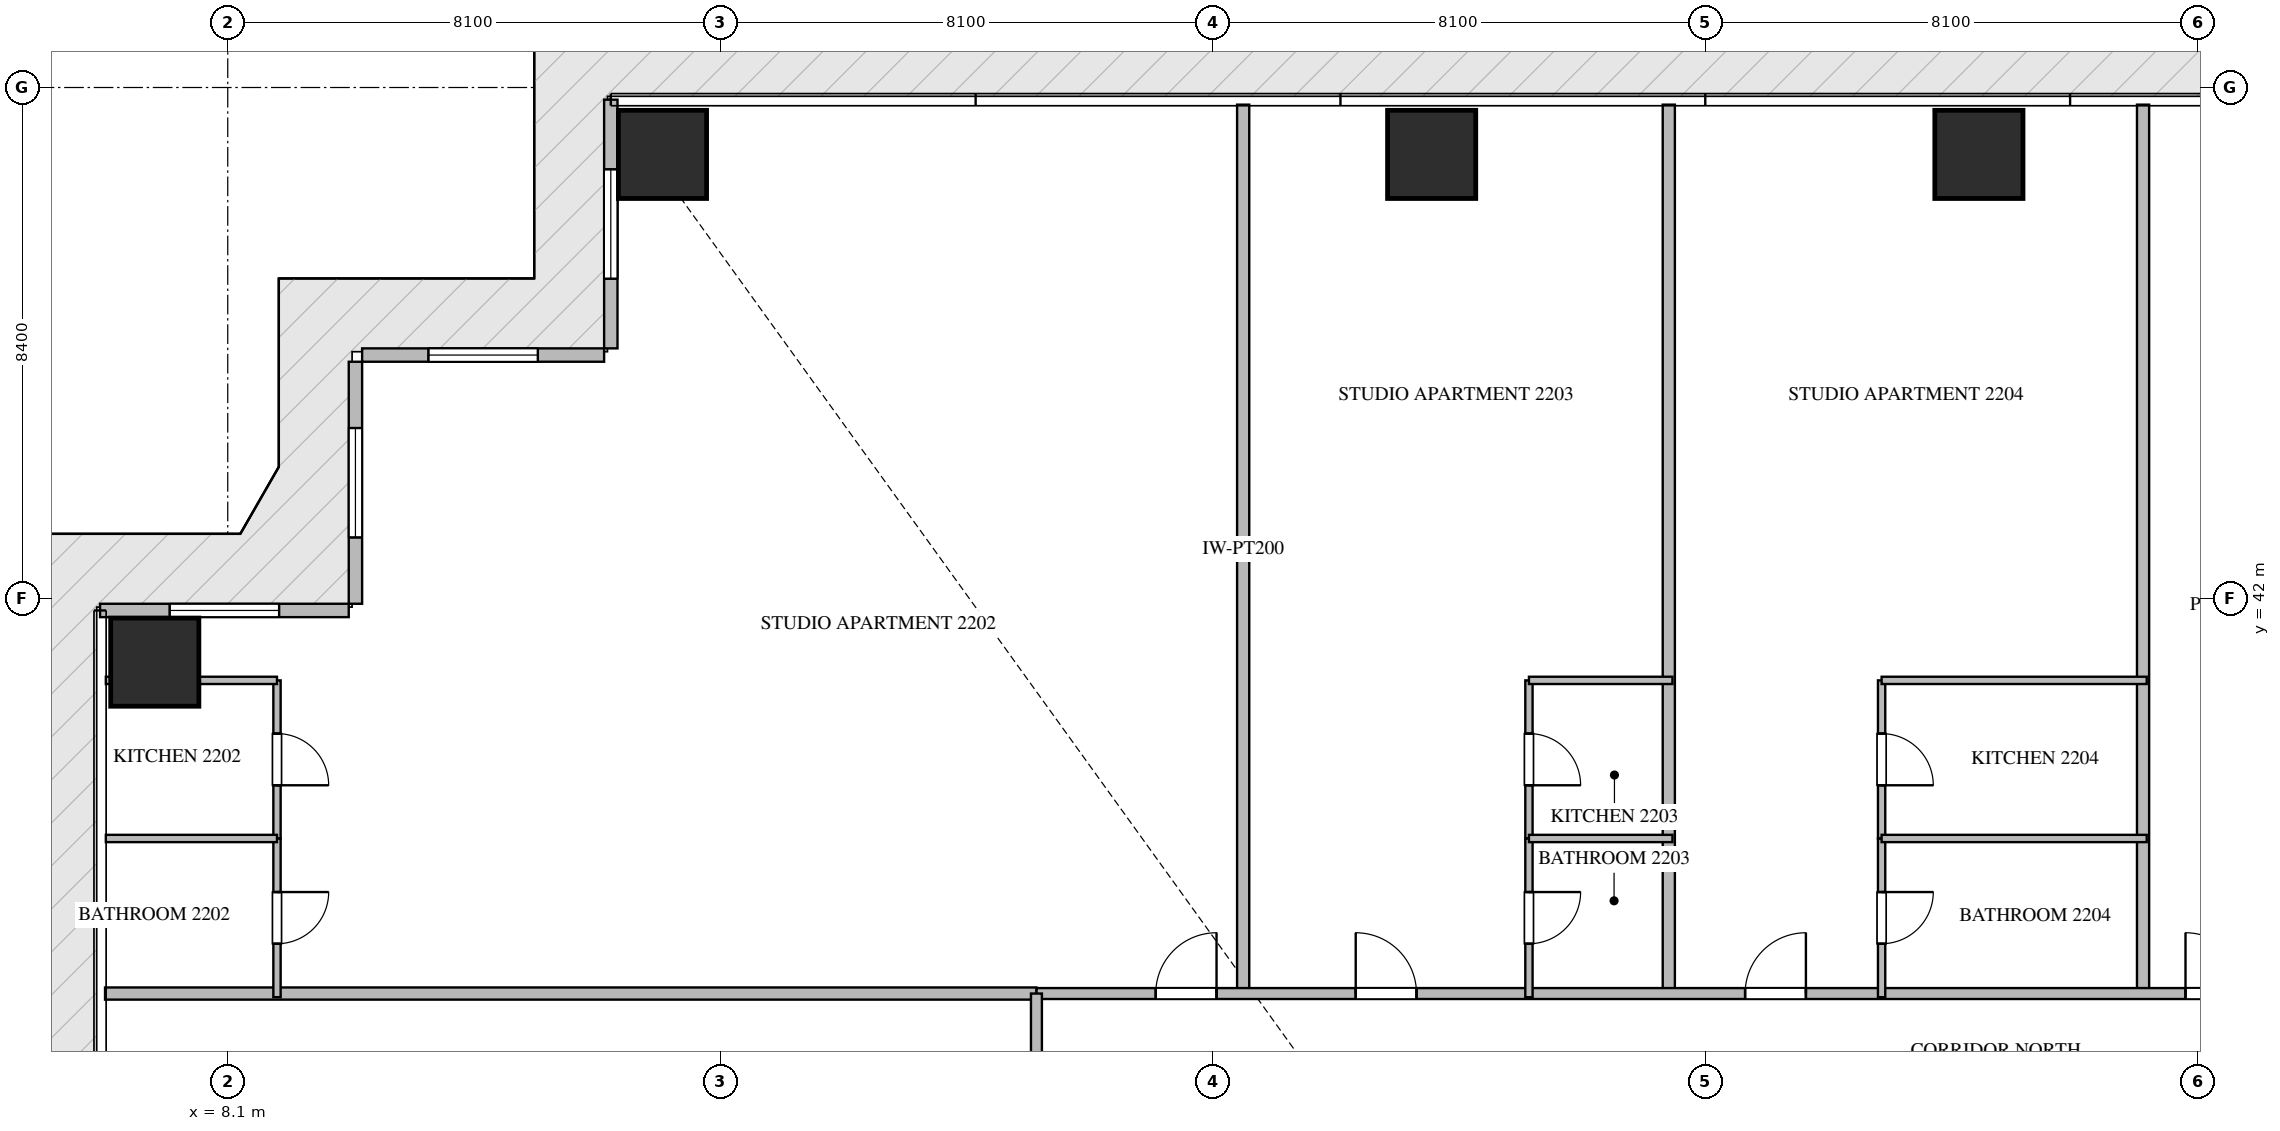
"""IFC4 building model, lengths in metres.
Left out: names, types, materials, properties, quantities, classifications, styles, units other than length and angle.
Written with IfcOpenShell. Run it as: python <this file> out.ifc"""

import sys

from ifc_helpers import new_model, si_unit, direction, frame, frame_2d, origin, origin_2d, place, context, subcontext, project, spatial, rectangle, extrude, source, transform, mapped, element, fill, save


model = new_model("IFC4")
c1 = context("Model", 3, precision=1e-05, world=origin(), true_north=direction((0.0, 1.0)))
c2 = subcontext(c1, "Body", "Model", "MODEL_VIEW")
j1 = project(units=[si_unit("LENGTHUNIT", "METRE"), si_unit("PLANEANGLEUNIT", "RADIAN")], contexts=[c1])
p1 = place(None, origin())
s1 = spatial("IfcSite", under=j1, at=p1, CompositionType="ELEMENT")
p2 = place(p1, origin())
s2 = spatial("IfcBuilding", under=s1, at=p2, CompositionType="ELEMENT")
p3 = place(p2, frame((0.0, 0.0, 90.45)))
s3 = spatial("IfcBuildingStorey", under=s2, at=p3, CompositionType="ELEMENT", Elevation=90.45)
m1 = source(origin(), c2, "Body", "SweptSolid", [
    extrude(rectangle(XDim=1.45, YDim=1.45, at=origin_2d()), origin(), (0.0, 0.0, 1.0), 3.75),
])
for number, where, z_axis, x_axis in (
    (1, (15.25, 49.3, -0.26), (0.0, 0.0, 1.0), (1.0, 0.0, 0.0)),
    (2, (27.9, 49.3, -0.26), (0.0, 0.0, 1.0), (1.0, 0.0, 0.0)),
    (3, (36.9, 49.3, -0.26), (0.0, 0.0, 1.0), (1.0, 0.0, 0.0)),
    (4, (6.9, 40.95, -0.26), (0.0, 0.0, 1.0), (1.0, 0.0, 0.0)),
):
    element("IfcColumn", number, at=place(p3, frame(where, z_axis=z_axis, x_axis=x_axis)), inside=s3, PredefinedType="COLUMN", context=c2, shape_type="MappedRepresentation", body=[
        mapped(m1, transform((0.0, 0.0, 0.0), scale=1.0)),
    ])
p4 = place(p3, frame((14.4, 50.2, 0.0), z_axis=(0.0, 0.0, 1.0), x_axis=(0.0, -1.0, 0.0)))
e5 = element("IfcWall", 5, at=p4, inside=s3, PredefinedType="ELEMENTEDWALL", context=c2, shape_type="SweptSolid", body=[
    extrude(rectangle(XDim=4.09, YDim=0.22, at=frame_2d((2.045, 0.0))), origin(), (0.0, 0.0, 1.0), 3.475),
])
p5 = place(p4, frame((1.145, 0.0, 0.65)))
e6 = element("IfcOpeningElement", 6, at=p5, cuts=e5, PredefinedType="OPENING", context=c2, shape_type="SweptSolid", body=[
    extrude(rectangle(XDim=1.8, YDim=2.1, at=frame_2d((0.9, 1.05))), frame((0.0, 0.12, 0.0), z_axis=(0.0, -1.0, 0.0), x_axis=(1.0, 0.0, 0.0)), (0.0, 0.0, 1.0), 0.24),
])
p6 = place(p3, frame((14.29, 46.0, 0.0), z_axis=(0.0, 0.0, 1.0), x_axis=(-1.0, 0.0, 0.0)))
e7 = element("IfcWall", 7, at=p6, inside=s3, PredefinedType="ELEMENTEDWALL", context=c2, shape_type="SweptSolid", body=[
    extrude(rectangle(XDim=3.98, YDim=0.22, at=frame_2d((1.99, 0.0))), origin(), (0.0, 0.0, 1.0), 3.475),
])
p7 = place(p6, frame((1.09, 0.0, 0.65)))
e8 = element("IfcOpeningElement", 8, at=p7, cuts=e7, PredefinedType="OPENING", context=c2, shape_type="SweptSolid", body=[
    extrude(rectangle(XDim=1.8, YDim=2.1, at=frame_2d((0.9, 1.05))), frame((0.0, 0.12, 0.0), z_axis=(0.0, -1.0, 0.0), x_axis=(1.0, 0.0, 0.0)), (0.0, 0.0, 1.0), 0.24),
])
p8 = place(p3, frame((10.2, 45.89, 0.0), z_axis=(0.0, 0.0, 1.0), x_axis=(0.0, -1.0, 0.0)))
e9 = element("IfcWall", 9, at=p8, inside=s3, PredefinedType="ELEMENTEDWALL", context=c2, shape_type="SweptSolid", body=[
    extrude(rectangle(XDim=3.98, YDim=0.22, at=frame_2d((1.99, 0.0))), origin(), (0.0, 0.0, 1.0), 3.475),
])
p9 = place(p8, frame((1.09, 0.0, 0.65)))
e10 = element("IfcOpeningElement", 10, at=p9, cuts=e9, PredefinedType="OPENING", context=c2, shape_type="SweptSolid", body=[
    extrude(rectangle(XDim=1.8, YDim=2.1, at=frame_2d((0.9, 1.05))), frame((0.0, 0.12, 0.0), z_axis=(0.0, -1.0, 0.0), x_axis=(1.0, 0.0, 0.0)), (0.0, 0.0, 1.0), 0.24),
])
p10 = place(p3, frame((10.09, 41.8, 0.0), z_axis=(0.0, 0.0, 1.0), x_axis=(-1.0, 0.0, 0.0)))
e11 = element("IfcWall", 11, at=p10, inside=s3, PredefinedType="ELEMENTEDWALL", context=c2, shape_type="SweptSolid", body=[
    extrude(rectangle(XDim=4.09, YDim=0.22, at=frame_2d((2.045, 0.0))), origin(), (0.0, 0.0, 1.0), 3.475),
])
p11 = place(p10, frame((1.145, 0.0, 0.65)))
e12 = element("IfcOpeningElement", 12, at=p11, cuts=e11, PredefinedType="OPENING", context=c2, shape_type="SweptSolid", body=[
    extrude(rectangle(XDim=1.8, YDim=2.1, at=frame_2d((0.9, 1.05))), frame((0.0, 0.12, 0.0), z_axis=(0.0, -1.0, 0.0), x_axis=(1.0, 0.0, 0.0)), (0.0, 0.0, 1.0), 0.24),
])
for number, where, z_axis, x_axis in (
    (13, (24.8, 35.5, 0.0), (0.0, 0.0, 1.0), (0.0, 1.0, 0.0)),
    (14, (31.8, 35.5, 0.0), (0.0, 0.0, 1.0), (0.0, 1.0, 0.0)),
    (15, (39.6, 35.5, 0.0), (0.0, 0.0, 1.0), (0.0, 1.0, 0.0)),
):
    element("IfcWall", number, at=place(p3, frame(where, z_axis=z_axis, x_axis=x_axis)), inside=s3, PredefinedType="PARTITIONING", context=c2, shape_type="SweptSolid", body=[
        extrude(rectangle(XDim=14.618, YDim=0.2, at=frame_2d((7.309, 0.0))), origin(), (0.0, 0.0, 1.0), 3.49),
    ])
p12 = place(p3, frame((6.082, 35.5, 0.0), z_axis=(0.0, 0.0, 1.0), x_axis=(1.0, 0.0, 0.0)))
e16 = element("IfcWall", 16, at=p12, inside=s3, PredefinedType="PARTITIONING", context=c2, shape_type="SweptSolid", body=[
    extrude(rectangle(XDim=15.318, YDim=0.2, at=frame_2d((7.659, 0.0))), origin(), (0.0, 0.0, 1.0), 3.49),
])
p13 = place(p3, frame((21.402, 35.5, 0.0), z_axis=(0.0, 0.0, 1.0), x_axis=(1.0, 0.0, 0.0)))
e17 = element("IfcWall", 17, at=p13, inside=s3, PredefinedType="PARTITIONING", context=c2, shape_type="SweptSolid", body=[
    extrude(rectangle(XDim=21.996, YDim=0.18, at=frame_2d((10.998, 0.0))), origin(), (0.0, 0.0, 1.0), 3.49),
])
p14 = place(p13, frame((1.96, 0.0, 0.0)))
e18 = element("IfcOpeningElement", 18, at=p14, cuts=e17, PredefinedType="OPENING", context=c2, shape_type="SweptSolid", body=[
    extrude(rectangle(XDim=1.0, YDim=2.15, at=frame_2d((0.5, 1.075))), frame((0.0, 0.1, 0.0), z_axis=(0.0, -1.0, 0.0), x_axis=(1.0, 0.0, 0.0)), (0.0, 0.0, 1.0), 0.2),
])
p15 = place(p13, frame((5.249, 0.0, 0.0)))
e19 = element("IfcOpeningElement", 19, at=p15, cuts=e17, PredefinedType="OPENING", context=c2, shape_type="SweptSolid", body=[
    extrude(rectangle(XDim=1.0, YDim=2.15, at=frame_2d((0.5, 1.075))), frame((0.0, 0.1, 0.0), z_axis=(0.0, -1.0, 0.0), x_axis=(1.0, 0.0, 0.0)), (0.0, 0.0, 1.0), 0.2),
])
p16 = place(p13, frame((11.653, 0.0, 0.0)))
e20 = element("IfcOpeningElement", 20, at=p16, cuts=e17, PredefinedType="OPENING", context=c2, shape_type="SweptSolid", body=[
    extrude(rectangle(XDim=1.0, YDim=2.15, at=frame_2d((0.5, 1.075))), frame((0.0, 0.1, 0.0), z_axis=(0.0, -1.0, 0.0), x_axis=(1.0, 0.0, 0.0)), (0.0, 0.0, 1.0), 0.2),
])
p17 = place(p13, frame((18.896, 0.0, 0.0)))
e21 = element("IfcOpeningElement", 21, at=p17, cuts=e17, PredefinedType="OPENING", context=c2, shape_type="SweptSolid", body=[
    extrude(rectangle(XDim=1.0, YDim=2.15, at=frame_2d((0.5, 1.075))), frame((0.0, 0.1, 0.0), z_axis=(0.0, -1.0, 0.0), x_axis=(1.0, 0.0, 0.0)), (0.0, 0.0, 1.0), 0.2),
])
p18 = place(p3, frame((21.4, 14.9, 0.0), z_axis=(0.0, 0.0, 1.0), x_axis=(0.0, 1.0, 0.0)))
e22 = element("IfcWall", 22, at=p18, inside=s3, PredefinedType="PARTITIONING", context=c2, shape_type="SweptSolid", body=[
    extrude(rectangle(XDim=20.6, YDim=0.18, at=frame_2d((10.3, 0.0))), origin(), (0.0, 0.0, 1.0), 3.49),
])
p19 = place(p18, frame((17.64, 0.0, 0.0)))
e23 = element("IfcOpeningElement", 23, at=p19, cuts=e22, PredefinedType="OPENING", context=c2, shape_type="SweptSolid", body=[
    extrude(rectangle(XDim=1.0, YDim=2.15, at=frame_2d((0.5, 1.075))), frame((0.0, 0.1, 0.0), z_axis=(0.0, -1.0, 0.0), x_axis=(1.0, 0.0, 0.0)), (0.0, 0.0, 1.0), 0.2),
])
p20 = place(p3, frame((8.91, 40.65, 0.0), z_axis=(0.0, 0.0, 1.0), x_axis=(0.0, -1.0, 0.0)))
e24 = element("IfcWall", 24, at=p20, inside=s3, PredefinedType="PARTITIONING", context=c2, shape_type="SweptSolid", body=[
    extrude(rectangle(XDim=2.6, YDim=0.12, at=frame_2d((1.3, 0.0))), origin(), (0.0, 0.0, 1.0), 3.49),
])
p21 = place(p20, frame((0.875, 0.0, 0.0)))
e25 = element("IfcOpeningElement", 25, at=p21, cuts=e24, PredefinedType="OPENING", context=c2, shape_type="SweptSolid", body=[
    extrude(rectangle(XDim=0.85, YDim=2.1, at=frame_2d((0.425, 1.05))), frame((0.0, 0.07, 0.0), z_axis=(0.0, -1.0, 0.0), x_axis=(1.0, 0.0, 0.0)), (0.0, 0.0, 1.0), 0.14),
])
p22 = place(p3, frame((8.91, 38.048, 0.0), z_axis=(0.0, 0.0, 1.0), x_axis=(0.0, -1.0, 0.0)))
e26 = element("IfcWall", 26, at=p22, inside=s3, PredefinedType="PARTITIONING", context=c2, shape_type="SweptSolid", body=[
    extrude(rectangle(XDim=2.608, YDim=0.12, at=frame_2d((1.304, 0.0))), origin(), (0.0, 0.0, 1.0), 3.49),
])
p23 = place(p22, frame((0.879, 0.0, 0.0)))
e27 = element("IfcOpeningElement", 27, at=p23, cuts=e26, PredefinedType="OPENING", context=c2, shape_type="SweptSolid", body=[
    extrude(rectangle(XDim=0.85, YDim=2.1, at=frame_2d((0.425, 1.05))), frame((0.0, 0.07, 0.0), z_axis=(0.0, -1.0, 0.0), x_axis=(1.0, 0.0, 0.0)), (0.0, 0.0, 1.0), 0.14),
])
for number, where, z_axis, x_axis in (
    (28, (6.095, 38.05, 0.0), (0.0, 0.0, 1.0), (1.0, 0.0, 0.0)),
    (29, (6.095, 40.65, 0.0), (0.0, 0.0, 1.0), (1.0, 0.0, 0.0)),
):
    element("IfcWall", number, at=place(p3, frame(where, z_axis=z_axis, x_axis=x_axis)), inside=s3, PredefinedType="PARTITIONING", context=c2, shape_type="SweptSolid", body=[
        extrude(rectangle(XDim=2.815, YDim=0.12, at=frame_2d((1.407, 0.0))), origin(), (0.0, 0.0, 1.0), 3.49),
    ])
p24 = place(p3, frame((29.5, 40.65, 0.0), z_axis=(0.0, 0.0, 1.0), x_axis=(0.0, -1.0, 0.0)))
e30 = element("IfcWall", 30, at=p24, inside=s3, PredefinedType="PARTITIONING", context=c2, shape_type="SweptSolid", body=[
    extrude(rectangle(XDim=2.6, YDim=0.12, at=frame_2d((1.3, 0.0))), origin(), (0.0, 0.0, 1.0), 3.49),
])
p25 = place(p24, frame((0.875, 0.0, 0.0)))
e31 = element("IfcOpeningElement", 31, at=p25, cuts=e30, PredefinedType="OPENING", context=c2, shape_type="SweptSolid", body=[
    extrude(rectangle(XDim=0.85, YDim=2.1, at=frame_2d((0.425, 1.05))), frame((0.0, 0.07, 0.0), z_axis=(0.0, -1.0, 0.0), x_axis=(1.0, 0.0, 0.0)), (0.0, 0.0, 1.0), 0.14),
])
p26 = place(p3, frame((29.5, 38.048, 0.0), z_axis=(0.0, 0.0, 1.0), x_axis=(0.0, -1.0, 0.0)))
e32 = element("IfcWall", 32, at=p26, inside=s3, PredefinedType="PARTITIONING", context=c2, shape_type="SweptSolid", body=[
    extrude(rectangle(XDim=2.608, YDim=0.12, at=frame_2d((1.304, 0.0))), origin(), (0.0, 0.0, 1.0), 3.49),
])
p27 = place(p26, frame((0.879, 0.0, 0.0)))
e33 = element("IfcOpeningElement", 33, at=p27, cuts=e32, PredefinedType="OPENING", context=c2, shape_type="SweptSolid", body=[
    extrude(rectangle(XDim=0.85, YDim=2.1, at=frame_2d((0.425, 1.05))), frame((0.0, 0.07, 0.0), z_axis=(0.0, -1.0, 0.0), x_axis=(1.0, 0.0, 0.0)), (0.0, 0.0, 1.0), 0.14),
])
for number, where, z_axis, x_axis in (
    (34, (29.5, 38.05, 0.0), (0.0, 0.0, 1.0), (1.0, 0.0, 0.0)),
    (35, (29.5, 40.65, 0.0), (0.0, 0.0, 1.0), (1.0, 0.0, 0.0)),
):
    element("IfcWall", number, at=place(p3, frame(where, z_axis=z_axis, x_axis=x_axis)), inside=s3, PredefinedType="PARTITIONING", context=c2, shape_type="SweptSolid", body=[
        extrude(rectangle(XDim=2.36, YDim=0.12, at=frame_2d((1.18, 0.0))), origin(), (0.0, 0.0, 1.0), 3.49),
    ])
p28 = place(p3, frame((35.3, 40.65, 0.0), z_axis=(0.0, 0.0, 1.0), x_axis=(0.0, -1.0, 0.0)))
e36 = element("IfcWall", 36, at=p28, inside=s3, PredefinedType="PARTITIONING", context=c2, shape_type="SweptSolid", body=[
    extrude(rectangle(XDim=2.6, YDim=0.12, at=frame_2d((1.3, 0.0))), origin(), (0.0, 0.0, 1.0), 3.49),
])
p29 = place(p28, frame((0.875, 0.0, 0.0)))
e37 = element("IfcOpeningElement", 37, at=p29, cuts=e36, PredefinedType="OPENING", context=c2, shape_type="SweptSolid", body=[
    extrude(rectangle(XDim=0.85, YDim=2.1, at=frame_2d((0.425, 1.05))), frame((0.0, 0.07, 0.0), z_axis=(0.0, -1.0, 0.0), x_axis=(1.0, 0.0, 0.0)), (0.0, 0.0, 1.0), 0.14),
])
p30 = place(p3, frame((35.3, 38.048, 0.0), z_axis=(0.0, 0.0, 1.0), x_axis=(0.0, -1.0, 0.0)))
e38 = element("IfcWall", 38, at=p30, inside=s3, PredefinedType="PARTITIONING", context=c2, shape_type="SweptSolid", body=[
    extrude(rectangle(XDim=2.608, YDim=0.12, at=frame_2d((1.304, 0.0))), origin(), (0.0, 0.0, 1.0), 3.49),
])
p31 = place(p30, frame((0.879, 0.0, 0.0)))
e39 = element("IfcOpeningElement", 39, at=p31, cuts=e38, PredefinedType="OPENING", context=c2, shape_type="SweptSolid", body=[
    extrude(rectangle(XDim=0.85, YDim=2.1, at=frame_2d((0.425, 1.05))), frame((0.0, 0.07, 0.0), z_axis=(0.0, -1.0, 0.0), x_axis=(1.0, 0.0, 0.0)), (0.0, 0.0, 1.0), 0.14),
])
for number, where, z_axis, x_axis in (
    (40, (35.3, 38.05, 0.0), (0.0, 0.0, 1.0), (1.0, 0.0, 0.0)),
    (41, (35.3, 40.65, 0.0), (0.0, 0.0, 1.0), (1.0, 0.0, 0.0)),
):
    element("IfcWall", number, at=place(p3, frame(where, z_axis=z_axis, x_axis=x_axis)), inside=s3, PredefinedType="PARTITIONING", context=c2, shape_type="SweptSolid", body=[
        extrude(rectangle(XDim=4.36, YDim=0.12, at=frame_2d((2.18, 0.0))), origin(), (0.0, 0.0, 1.0), 3.49),
    ])
m2 = source(origin(), c2, "Body", "SweptSolid", [
    extrude(rectangle(XDim=1.8, YDim=2.1, at=frame_2d((0.9, 1.05))), frame((0.0, 0.03, 0.0), z_axis=(0.0, -1.0, 0.0), x_axis=(1.0, 0.0, 0.0)), (0.0, 0.0, 1.0), 0.06),
])
p32 = place(p5, origin())
e42 = element("IfcWindow", 42, at=p32, inside=s3, PartitioningType="SINGLE_PANEL", PredefinedType="WINDOW", context=c2, shape_type="MappedRepresentation", body=[
    mapped(m2, transform((0.0, 0.0, 0.0), scale=1.0)),
])
fill(e6, e42)
p33 = place(p7, origin())
e43 = element("IfcWindow", 43, at=p33, inside=s3, PartitioningType="SINGLE_PANEL", PredefinedType="WINDOW", context=c2, shape_type="MappedRepresentation", body=[
    mapped(m2, transform((0.0, 0.0, 0.0), scale=1.0)),
])
fill(e8, e43)
p34 = place(p9, origin())
e44 = element("IfcWindow", 44, at=p34, inside=s3, PartitioningType="SINGLE_PANEL", PredefinedType="WINDOW", context=c2, shape_type="MappedRepresentation", body=[
    mapped(m2, transform((0.0, 0.0, 0.0), scale=1.0)),
])
fill(e10, e44)
p35 = place(p11, origin())
e45 = element("IfcWindow", 45, at=p35, inside=s3, PartitioningType="SINGLE_PANEL", PredefinedType="WINDOW", context=c2, shape_type="MappedRepresentation", body=[
    mapped(m2, transform((0.0, 0.0, 0.0), scale=1.0)),
])
fill(e12, e45)
m3 = source(origin(), c2, "Body", "SweptSolid", [
    extrude(rectangle(XDim=1.0, YDim=2.15, at=frame_2d((0.5, 1.075))), frame((0.0, 0.025, 0.0), z_axis=(0.0, -1.0, 0.0), x_axis=(1.0, 0.0, 0.0)), (0.0, 0.0, 1.0), 0.05),
])
p36 = place(p14, origin())
e46 = element("IfcDoor", 46, at=p36, inside=s3, OperationType="SINGLE_SWING_RIGHT", PredefinedType="DOOR", context=c2, shape_type="MappedRepresentation", body=[
    mapped(m3, transform((0.0, 0.0, 0.0), scale=1.0)),
])
fill(e18, e46)
p37 = place(p15, origin())
e47 = element("IfcDoor", 47, at=p37, inside=s3, OperationType="SINGLE_SWING_LEFT", PredefinedType="DOOR", context=c2, shape_type="MappedRepresentation", body=[
    mapped(m3, transform((0.0, 0.0, 0.0), scale=1.0)),
])
fill(e19, e47)
p38 = place(p16, origin())
e48 = element("IfcDoor", 48, at=p38, inside=s3, OperationType="SINGLE_SWING_RIGHT", PredefinedType="DOOR", context=c2, shape_type="MappedRepresentation", body=[
    mapped(m3, transform((0.0, 0.0, 0.0), scale=1.0)),
])
fill(e20, e48)
p39 = place(p17, origin())
e49 = element("IfcDoor", 49, at=p39, inside=s3, OperationType="SINGLE_SWING_LEFT", PredefinedType="DOOR", context=c2, shape_type="MappedRepresentation", body=[
    mapped(m3, transform((0.0, 0.0, 0.0), scale=1.0)),
])
fill(e21, e49)
m4 = source(origin(), c2, "Body", "SweptSolid", [
    extrude(rectangle(XDim=0.85, YDim=2.1, at=frame_2d((0.425, 1.05))), frame((0.0, 0.025, 0.0), z_axis=(0.0, -1.0, 0.0), x_axis=(1.0, 0.0, 0.0)), (0.0, 0.0, 1.0), 0.05),
])
p40 = place(p21, origin())
e50 = element("IfcDoor", 50, at=p40, inside=s3, OperationType="SINGLE_SWING_RIGHT", PredefinedType="DOOR", context=c2, shape_type="MappedRepresentation", body=[
    mapped(m4, transform((0.0, 0.0, 0.0), scale=1.0)),
])
fill(e25, e50)
p41 = place(p23, origin())
e51 = element("IfcDoor", 51, at=p41, inside=s3, OperationType="SINGLE_SWING_LEFT", PredefinedType="DOOR", context=c2, shape_type="MappedRepresentation", body=[
    mapped(m4, transform((0.0, 0.0, 0.0), scale=1.0)),
])
fill(e27, e51)
p42 = place(p25, origin())
e52 = element("IfcDoor", 52, at=p42, inside=s3, OperationType="SINGLE_SWING_RIGHT", PredefinedType="DOOR", context=c2, shape_type="MappedRepresentation", body=[
    mapped(m4, transform((0.0, 0.0, 0.0), scale=1.0)),
])
fill(e31, e52)
p43 = place(p27, origin())
e53 = element("IfcDoor", 53, at=p43, inside=s3, OperationType="SINGLE_SWING_LEFT", PredefinedType="DOOR", context=c2, shape_type="MappedRepresentation", body=[
    mapped(m4, transform((0.0, 0.0, 0.0), scale=1.0)),
])
fill(e33, e53)
p44 = place(p29, origin())
e54 = element("IfcDoor", 54, at=p44, inside=s3, OperationType="SINGLE_SWING_RIGHT", PredefinedType="DOOR", context=c2, shape_type="MappedRepresentation", body=[
    mapped(m4, transform((0.0, 0.0, 0.0), scale=1.0)),
])
fill(e37, e54)
p45 = place(p31, origin())
e55 = element("IfcDoor", 55, at=p45, inside=s3, OperationType="SINGLE_SWING_LEFT", PredefinedType="DOOR", context=c2, shape_type="MappedRepresentation", body=[
    mapped(m4, transform((0.0, 0.0, 0.0), scale=1.0)),
])
fill(e39, e55)
save(model, sys.argv[1])
